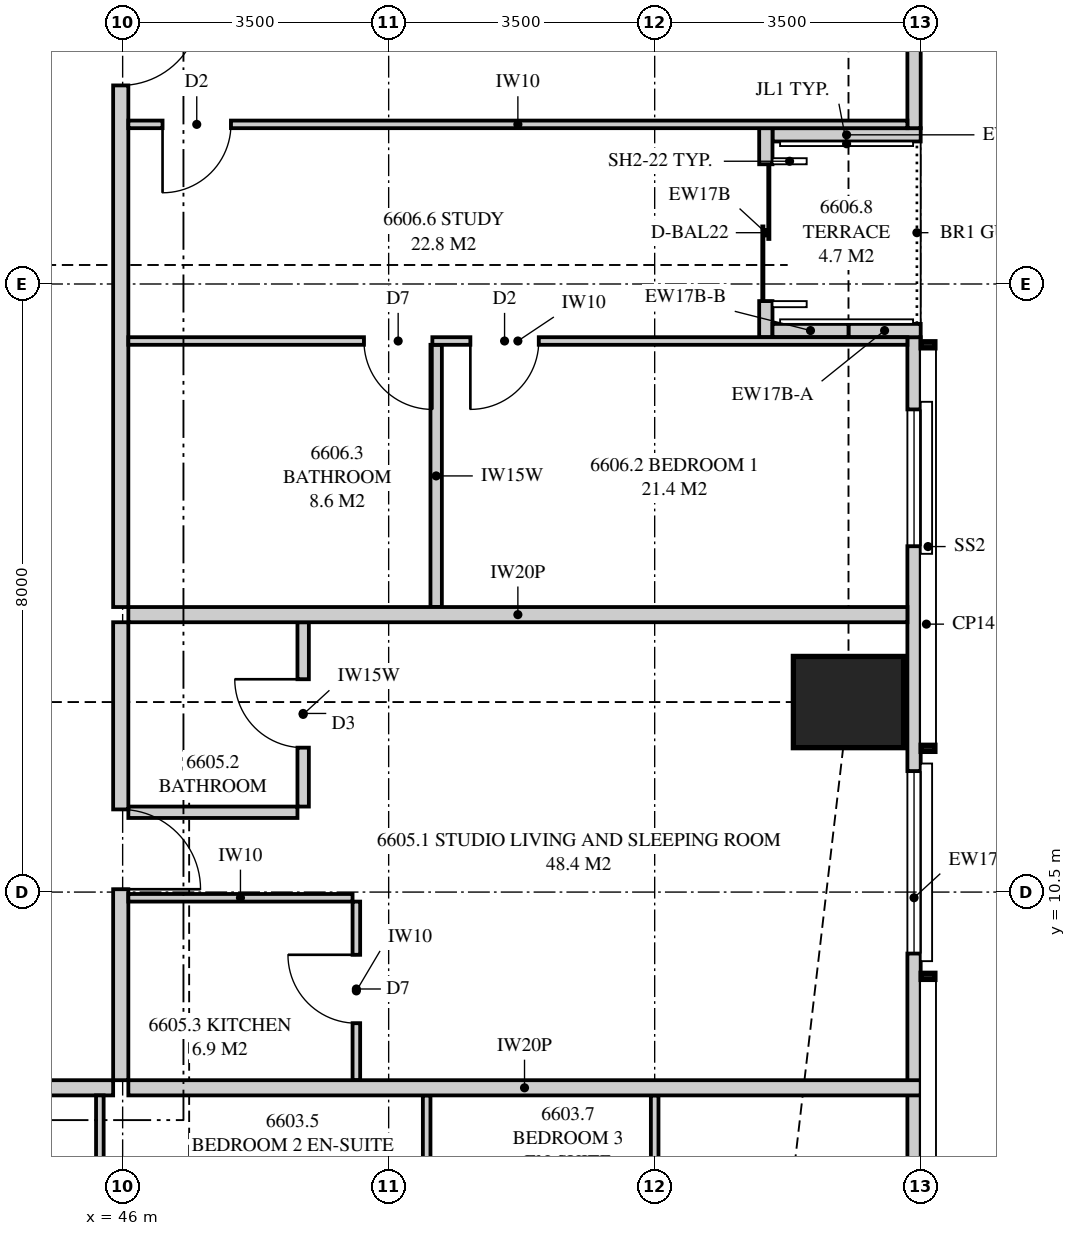
"""IFC4 building model, lengths in metres.
Left out: names, types, materials, properties, quantities, classifications, styles, units other than length and angle.
Written with IfcOpenShell. Run it as: python <this file> out.ifc"""

import sys

from ifc_helpers import new_model, si_unit, direction, frame, frame_2d, origin, origin_2d, place, context, subcontext, project, spatial, polyline, rectangle, outline, extrude, element, fill, save


model = new_model("IFC4")
c1 = context("Model", 3, precision=1e-05, world=origin(), true_north=direction((0.0, 1.0)))
c2 = subcontext(c1, "Body", "Model", "MODEL_VIEW")
j1 = project(units=[si_unit("LENGTHUNIT", "METRE"), si_unit("PLANEANGLEUNIT", "RADIAN")], contexts=[c1])
p1 = place(None, origin())
s1 = spatial("IfcSite", under=j1, at=p1, CompositionType="ELEMENT")
p2 = place(p1, origin())
s2 = spatial("IfcBuilding", under=s1, at=p2, CompositionType="ELEMENT")
p3 = place(p2, frame((0.0, 0.0, 242.45)))
s3 = spatial("IfcBuildingStorey", under=s2, at=p3, CompositionType="ELEMENT", Elevation=242.45)
p4 = place(p3, frame((55.55, 13.0, 0.0), z_axis=(0.0, 0.0, 1.0), x_axis=(1.0, 0.0, 0.0)))
e1 = element("IfcColumn", 1, at=p4, inside=s3, PredefinedType="COLUMN", context=c2, shape_type="SweptSolid", body=[
    extrude(rectangle(XDim=1.45, YDim=1.2, at=origin_2d()), origin(), (0.0, 0.0, 1.0), 3.5),
])
p5 = place(p3, frame((56.413, 3.051, 0.0), z_axis=(0.0, 0.0, 1.0), x_axis=(0.0, 1.0, 0.0)))
e2 = element("IfcWall", 2, at=p5, inside=s3, PredefinedType="SOLIDWALL", context=c2, shape_type="SweptSolid", body=[
    extrude(outline(polyline([(0.0, 0.0), (14.749, 0.0), (14.749, 2.3), (9.949, 2.3), (9.949, 3.26), (9.858, 3.26), (9.858, 2.3), (9.688, 2.3), (9.688, 3.26), (0.0, 3.26), (0.0, 0.0)])), frame((0.0, 0.087, 0.0), z_axis=(0.0, -1.0, 0.0), x_axis=(1.0, 0.0, 0.0)), (0.0, 0.0, 1.0), 0.175),
])
p6 = place(p5, frame((6.64, 0.0, 0.4)))
e3 = element("IfcOpeningElement", 3, at=p6, cuts=e2, PredefinedType="OPENING", context=c2, shape_type="SweptSolid", body=[
    extrude(rectangle(XDim=2.4, YDim=1.85, at=frame_2d((1.2, 0.925))), frame((0.0, 0.097, 0.0), z_axis=(0.0, -1.0, 0.0), x_axis=(1.0, 0.0, 0.0)), (0.0, 0.0, 1.0), 0.195),
])
p7 = place(p5, frame((11.999, 0.0, 0.4)))
e4 = element("IfcOpeningElement", 4, at=p7, cuts=e2, PredefinedType="OPENING", context=c2, shape_type="SweptSolid", body=[
    extrude(rectangle(XDim=1.8, YDim=1.85, at=frame_2d((0.9, 0.925))), frame((0.0, 0.097, 0.0), z_axis=(0.0, -1.0, 0.0), x_axis=(1.0, 0.0, 0.0)), (0.0, 0.0, 1.0), 0.195),
])
p8 = place(p3, frame((56.413, 20.55, 0.0), z_axis=(0.0, 0.0, 1.0), x_axis=(0.0, 1.0, 0.0)))
e5 = element("IfcWall", 5, at=p8, inside=s3, PredefinedType="SOLIDWALL", context=c2, shape_type="SweptSolid", body=[
    extrude(outline(polyline([(0.0, 0.0), (10.399, 0.0), (10.399, 3.26), (4.658, 3.26), (4.658, 2.3), (4.594, 2.3), (4.594, 3.26), (4.45, 3.26), (4.45, 2.3), (0.0, 2.3), (0.0, 0.0)])), frame((0.0, 0.087, 0.0), z_axis=(0.0, -1.0, 0.0), x_axis=(1.0, 0.0, 0.0)), (0.0, 0.0, 1.0), 0.175),
])
p9 = place(p8, frame((1.2, 0.0, 0.4)))
e6 = element("IfcOpeningElement", 6, at=p9, cuts=e5, PredefinedType="OPENING", context=c2, shape_type="SweptSolid", body=[
    extrude(rectangle(XDim=2.4, YDim=1.85, at=frame_2d((1.2, 0.925))), frame((0.0, 0.097, 0.0), z_axis=(0.0, -1.0, 0.0), x_axis=(1.0, 0.0, 0.0)), (0.0, 0.0, 1.0), 0.195),
])
p10 = place(p8, frame((5.988, 0.0, 0.4)))
e7 = element("IfcOpeningElement", 7, at=p10, cuts=e5, PredefinedType="OPENING", context=c2, shape_type="SweptSolid", body=[
    extrude(rectangle(XDim=1.8, YDim=1.85, at=frame_2d((0.9, 0.925))), frame((0.0, 0.097, 0.0), z_axis=(0.0, -1.0, 0.0), x_axis=(1.0, 0.0, 0.0)), (0.0, 0.0, 1.0), 0.195),
])
p11 = place(p3, frame((54.462, 17.8, 0.0), z_axis=(0.0, 0.0, 1.0), x_axis=(0.0, 1.0, 0.0)))
e8 = element("IfcWall", 8, at=p11, inside=s3, PredefinedType="SOLIDWALL", context=c2, shape_type="SweptSolid", body=[
    extrude(outline(polyline([(0.0, 0.0), (2.75, 0.0), (2.75, 3.26), (2.15, 3.26), (2.15, 2.66), (0.0, 2.66), (0.0, 0.0)])), frame((0.0, 0.087, 0.0), z_axis=(0.0, -1.0, 0.0), x_axis=(1.0, 0.0, 0.0)), (0.0, 0.0, 1.0), 0.175),
])
p12 = place(p11, frame((0.475, 0.0, 0.0)))
e9 = element("IfcOpeningElement", 9, at=p12, cuts=e8, PredefinedType="OPENING", context=c2, shape_type="SweptSolid", body=[
    extrude(rectangle(XDim=1.8, YDim=2.25, at=frame_2d((0.9, 1.125))), frame((0.0, 0.097, 0.0), z_axis=(0.0, -1.0, 0.0), x_axis=(1.0, 0.0, 0.0)), (0.0, 0.0, 1.0), 0.195),
])
p13 = place(p3, frame((56.5, 17.887, 0.0), z_axis=(0.0, 0.0, 1.0), x_axis=(-1.0, 0.0, 0.0)))
e10 = element("IfcWall", 10, at=p13, inside=s3, PredefinedType="SOLIDWALL", context=c2, shape_type="SweptSolid", body=[
    extrude(outline(polyline([(0.0, 0.0), (0.95, 0.0), (0.95, 2.3), (0.15, 2.3), (0.15, 3.26), (0.0, 3.26), (0.0, 0.0)])), frame((0.0, 0.087, 0.0), z_axis=(0.0, -1.0, 0.0), x_axis=(1.0, 0.0, 0.0)), (0.0, 0.0, 1.0), 0.175),
])
p14 = place(p3, frame((55.55, 17.887, 0.0), z_axis=(0.0, 0.0, 1.0), x_axis=(-1.0, 0.0, 0.0)))
e11 = element("IfcWall", 11, at=p14, inside=s3, PredefinedType="SOLIDWALL", context=c2, shape_type="SweptSolid", body=[
    extrude(outline(polyline([(0.0, 0.0), (1.0, 0.0), (1.0, 2.66), (0.8, 2.66), (0.8, 2.3), (0.0, 2.3), (0.0, 0.0)])), frame((0.0, 0.087, 0.0), z_axis=(0.0, -1.0, 0.0), x_axis=(1.0, 0.0, 0.0)), (0.0, 0.0, 1.0), 0.175),
])
p15 = place(p3, frame((56.5, 20.462, 0.0), z_axis=(0.0, 0.0, 1.0), x_axis=(-1.0, 0.0, 0.0)))
e12 = element("IfcWall", 12, at=p15, inside=s3, PredefinedType="SOLIDWALL", context=c2, shape_type="SweptSolid", body=[
    extrude(outline(polyline([(0.0, 0.0), (1.95, 0.0), (1.95, 3.26), (1.75, 3.26), (1.75, 2.3), (0.15, 2.3), (0.15, 3.26), (0.0, 3.26), (0.0, 0.0)])), frame((0.0, 0.087, 0.0), z_axis=(0.0, -1.0, 0.0), x_axis=(1.0, 0.0, 0.0)), (0.0, 0.0, 1.0), 0.175),
])
p16 = place(p3, frame((36.55, 7.925, 0.0), z_axis=(0.0, 0.0, 1.0), x_axis=(1.0, 0.0, 0.0)))
e13 = element("IfcWall", 13, at=p16, inside=s3, PredefinedType="PARTITIONING", context=c2, shape_type="SweptSolid", body=[
    extrude(outline(polyline([(0.0, 0.0), (9.325, 0.0), (9.325, 3.26), (9.325, 2.66), (9.015, 2.66), (9.015, 3.26), (2.01, 3.26), (2.01, 2.66), (0.0, 2.66), (0.0, 3.26), (0.0, 0.0)])), frame((0.0, 0.1, 0.0), z_axis=(0.0, -1.0, 0.0), x_axis=(1.0, 0.0, 0.0)), (0.0, 0.0, 1.0), 0.2),
])
p17 = place(p16, frame((4.15, 0.0, 0.0)))
e14 = element("IfcOpeningElement", 14, at=p17, cuts=e13, PredefinedType="OPENING", context=c2, shape_type="SweptSolid", body=[
    extrude(rectangle(XDim=1.05, YDim=2.2, at=frame_2d((0.525, 1.1))), frame((0.0, 0.11, 0.0), z_axis=(0.0, -1.0, 0.0), x_axis=(1.0, 0.0, 0.0)), (0.0, 0.0, 1.0), 0.22),
])
p18 = place(p3, frame((45.7, 0.175, 0.0), z_axis=(0.0, 0.0, 1.0), x_axis=(0.0, 1.0, 0.0)))
e15 = element("IfcWall", 15, at=p18, inside=s3, PredefinedType="PARTITIONING", context=c2, shape_type="SweptSolid", body=[
    extrude(outline(polyline([(0.0, 0.0), (7.65, 0.0), (7.65, 3.26), (7.65, 2.66), (1.635, 2.66), (1.635, 2.3), (0.0, 2.3), (0.0, 3.26), (0.0, 0.0)])), frame((0.0, 0.05, 0.0), z_axis=(0.0, -1.0, 0.0), x_axis=(1.0, 0.0, 0.0)), (0.0, 0.0, 1.0), 0.1),
])
p19 = place(p18, frame((3.8, 0.0, 0.0)))
e16 = element("IfcOpeningElement", 16, at=p19, cuts=e15, PredefinedType="OPENING", context=c2, shape_type="SweptSolid", body=[
    extrude(rectangle(XDim=0.9, YDim=2.1, at=frame_2d((0.45, 1.05))), frame((0.0, 0.06, 0.0), z_axis=(0.0, -1.0, 0.0), x_axis=(1.0, 0.0, 0.0)), (0.0, 0.0, 1.0), 0.12),
])
p20 = place(p3, frame((50.0, 0.175, 0.0), z_axis=(0.0, 0.0, 1.0), x_axis=(0.0, 1.0, 0.0)))
e17 = element("IfcWall", 17, at=p20, inside=s3, PredefinedType="PARTITIONING", context=c2, shape_type="SweptSolid", body=[
    extrude(outline(polyline([(0.0, 0.0), (7.65, 0.0), (7.65, 3.26), (2.177, 3.26), (2.177, 2.3), (0.432, 2.3), (0.432, 3.26), (0.0, 3.26), (0.0, 0.0)])), frame((0.0, 0.05, 0.0), z_axis=(0.0, -1.0, 0.0), x_axis=(1.0, 0.0, 0.0)), (0.0, 0.0, 1.0), 0.1),
])
p21 = place(p20, frame((3.8, 0.0, 0.0)))
e18 = element("IfcOpeningElement", 18, at=p21, cuts=e17, PredefinedType="OPENING", context=c2, shape_type="SweptSolid", body=[
    extrude(rectangle(XDim=0.9, YDim=2.1, at=frame_2d((0.45, 1.05))), frame((0.0, 0.06, 0.0), z_axis=(0.0, -1.0, 0.0), x_axis=(1.0, 0.0, 0.0)), (0.0, 0.0, 1.0), 0.12),
])
p22 = place(p3, frame((53.0, 0.175, 0.0), z_axis=(0.0, 0.0, 1.0), x_axis=(0.0, 1.0, 0.0)))
e19 = element("IfcWall", 19, at=p22, inside=s3, PredefinedType="PARTITIONING", context=c2, shape_type="SweptSolid", body=[
    extrude(outline(polyline([(0.0, 0.0), (7.65, 0.0), (7.65, 3.26), (2.685, 3.26), (2.685, 2.3), (0.941, 2.3), (0.941, 3.26), (0.0, 3.26), (0.0, 0.0)])), frame((0.0, 0.05, 0.0), z_axis=(0.0, -1.0, 0.0), x_axis=(1.0, 0.0, 0.0)), (0.0, 0.0, 1.0), 0.1),
])
p23 = place(p22, frame((3.8, 0.0, 0.0)))
e20 = element("IfcOpeningElement", 20, at=p23, cuts=e19, PredefinedType="OPENING", context=c2, shape_type="SweptSolid", body=[
    extrude(rectangle(XDim=0.9, YDim=2.1, at=frame_2d((0.45, 1.05))), frame((0.0, 0.06, 0.0), z_axis=(0.0, -1.0, 0.0), x_axis=(1.0, 0.0, 0.0)), (0.0, 0.0, 1.0), 0.12),
])
p24 = place(p3, frame((46.075, 7.925, 0.0), z_axis=(0.0, 0.0, 1.0), x_axis=(1.0, 0.0, 0.0)))
e21 = element("IfcWall", 21, at=p24, inside=s3, PredefinedType="PARTITIONING", context=c2, shape_type="SweptSolid", body=[
    extrude(outline(polyline([(0.0, 0.0), (10.425, 0.0), (10.425, 3.26), (9.8, 3.26), (9.8, 2.3), (7.968, 2.3), (7.968, 3.26), (2.11, 3.26), (2.11, 2.66), (0.0, 2.66), (0.0, 3.26), (0.0, 0.0)])), frame((0.0, 0.1, 0.0), z_axis=(0.0, -1.0, 0.0), x_axis=(1.0, 0.0, 0.0)), (0.0, 0.0, 1.0), 0.2),
])
p25 = place(p3, frame((56.325, 14.15, 0.0), z_axis=(0.0, 0.0, 1.0), x_axis=(-1.0, 0.0, 0.0)))
e22 = element("IfcWall", 22, at=p25, inside=s3, PredefinedType="PARTITIONING", context=c2, shape_type="SweptSolid", body=[
    extrude(outline(polyline([(0.0, 0.0), (10.25, 0.0), (10.25, 3.26), (10.25, 2.66), (1.685, 2.66), (1.685, 2.3), (0.0, 2.3), (0.0, 3.26), (0.0, 0.0)])), frame((0.0, 0.1, 0.0), z_axis=(0.0, -1.0, 0.0), x_axis=(1.0, 0.0, 0.0)), (0.0, 0.0, 1.0), 0.2),
])
p26 = place(p3, frame((45.975, 8.025, 0.0), z_axis=(0.0, 0.0, 1.0), x_axis=(0.0, 1.0, 0.0)))
e23 = element("IfcWall", 23, at=p26, inside=s3, PredefinedType="PARTITIONING", context=c2, shape_type="SweptSolid", body=[
    extrude(outline(polyline([(0.0, 0.0), (6.025, 0.0), (6.025, 3.26), (6.025, 2.66), (5.085, 2.66), (0.0, 2.66), (0.0, 3.26), (0.0, 0.0)])), frame((0.0, 0.1, 0.0), z_axis=(0.0, -1.0, 0.0), x_axis=(1.0, 0.0, 0.0)), (0.0, 0.0, 1.0), 0.2),
])
p27 = place(p26, frame((2.512, 0.0, 0.0)))
e24 = element("IfcOpeningElement", 24, at=p27, cuts=e23, PredefinedType="OPENING", context=c2, shape_type="SweptSolid", body=[
    extrude(rectangle(XDim=1.05, YDim=2.2, at=frame_2d((0.525, 1.1))), frame((0.0, 0.11, 0.0), z_axis=(0.0, -1.0, 0.0), x_axis=(1.0, 0.0, 0.0)), (0.0, 0.0, 1.0), 0.22),
])
p28 = place(p3, frame((48.375, 11.625, 0.0), z_axis=(0.0, 0.0, 1.0), x_axis=(0.0, 1.0, 0.0)))
e25 = element("IfcWall", 25, at=p28, inside=s3, PredefinedType="PLUMBINGWALL", context=c2, shape_type="SweptSolid", body=[
    extrude(outline(polyline([(0.0, 0.0), (2.425, 0.0), (2.425, 3.26), (2.425, 2.66), (0.09, 2.66), (0.09, 3.26), (0.0, 3.26), (0.0, 0.0)])), frame((0.0, 0.075, 0.0), z_axis=(0.0, -1.0, 0.0), x_axis=(1.0, 0.0, 0.0)), (0.0, 0.0, 1.0), 0.15),
])
p29 = place(p28, frame((0.775, 0.0, 0.0)))
e26 = element("IfcOpeningElement", 26, at=p29, cuts=e25, PredefinedType="OPENING", context=c2, shape_type="SweptSolid", body=[
    extrude(rectangle(XDim=0.9, YDim=2.1, at=frame_2d((0.45, 1.05))), frame((0.0, 0.085, 0.0), z_axis=(0.0, -1.0, 0.0), x_axis=(1.0, 0.0, 0.0)), (0.0, 0.0, 1.0), 0.17),
])
p30 = place(p3, frame((48.3, 11.55, 0.0), z_axis=(0.0, 0.0, 1.0), x_axis=(-1.0, 0.0, 0.0)))
e27 = element("IfcWall", 27, at=p30, inside=s3, PredefinedType="PLUMBINGWALL", context=c2, shape_type="SweptSolid", body=[
    extrude(outline(polyline([(0.0, 0.0), (2.225, 0.0), (2.225, 3.26), (2.225, 2.66), (0.14, 2.66), (0.14, 3.26), (0.0, 3.26), (0.0, 0.0)])), frame((0.0, 0.075, 0.0), z_axis=(0.0, -1.0, 0.0), x_axis=(1.0, 0.0, 0.0)), (0.0, 0.0, 1.0), 0.15),
])
p31 = place(p3, frame((49.075, 8.025, 0.0), z_axis=(0.0, 0.0, 1.0), x_axis=(0.0, 1.0, 0.0)))
e28 = element("IfcWall", 28, at=p31, inside=s3, PredefinedType="PARTITIONING", context=c2, shape_type="SweptSolid", body=[
    extrude(rectangle(XDim=2.35, YDim=0.1, at=frame_2d((1.175, 0.0))), origin(), (0.0, 0.0, 1.0), 3.26),
])
p32 = place(p31, frame((0.75, 0.0, 0.0)))
e29 = element("IfcOpeningElement", 29, at=p32, cuts=e28, PredefinedType="OPENING", context=c2, shape_type="SweptSolid", body=[
    extrude(rectangle(XDim=0.9, YDim=2.1, at=frame_2d((0.45, 1.05))), frame((0.0, 0.06, 0.0), z_axis=(0.0, -1.0, 0.0), x_axis=(1.0, 0.0, 0.0)), (0.0, 0.0, 1.0), 0.12),
])
p33 = place(p3, frame((49.025, 10.425, 0.0), z_axis=(0.0, 0.0, 1.0), x_axis=(-1.0, 0.0, 0.0)))
e30 = element("IfcWall", 30, at=p33, inside=s3, PredefinedType="PARTITIONING", context=c2, shape_type="SweptSolid", body=[
    extrude(outline(polyline([(0.0, 0.0), (2.95, 0.0), (2.95, 3.26), (2.95, 2.66), (0.89, 2.66), (0.89, 3.26), (0.0, 3.26), (0.0, 0.0)])), frame((0.0, 0.05, 0.0), z_axis=(0.0, -1.0, 0.0), x_axis=(1.0, 0.0, 0.0)), (0.0, 0.0, 1.0), 0.1),
])
p34 = place(p3, frame((45.975, 14.25, 0.0), z_axis=(0.0, 0.0, 1.0), x_axis=(0.0, 1.0, 0.0)))
e31 = element("IfcWall", 31, at=p34, inside=s3, PredefinedType="PARTITIONING", context=c2, shape_type="SweptSolid", body=[
    extrude(outline(polyline([(0.0, 0.0), (10.75, 0.0), (10.75, 2.66), (9.44, 2.66), (9.44, 3.26), (5.81, 3.26), (5.81, 2.66), (3.19, 2.66), (3.19, 3.26), (0.06, 3.26), (0.06, 2.66), (0.0, 2.66), (0.0, 0.0)])), frame((0.0, 0.1, 0.0), z_axis=(0.0, -1.0, 0.0), x_axis=(1.0, 0.0, 0.0)), (0.0, 0.0, 1.0), 0.2),
])
p35 = place(p34, frame((6.863, 0.0, 0.0)))
e32 = element("IfcOpeningElement", 32, at=p35, cuts=e31, PredefinedType="OPENING", context=c2, shape_type="SweptSolid", body=[
    extrude(rectangle(XDim=1.05, YDim=2.2, at=frame_2d((0.525, 1.1))), frame((0.0, 0.11, 0.0), z_axis=(0.0, -1.0, 0.0), x_axis=(1.0, 0.0, 0.0)), (0.0, 0.0, 1.0), 0.22),
])
p36 = place(p3, frame((56.325, 17.75, 0.0), z_axis=(0.0, 0.0, 1.0), x_axis=(-1.0, 0.0, 0.0)))
e33 = element("IfcWall", 33, at=p36, inside=s3, PredefinedType="PARTITIONING", context=c2, shape_type="SweptSolid", body=[
    extrude(outline(polyline([(0.0, 0.0), (10.25, 0.0), (10.25, 3.26), (10.25, 2.66), (1.635, 2.66), (1.635, 2.3), (0.0, 2.3), (0.0, 3.26), (0.0, 0.0)])), frame((0.0, 0.05, 0.0), z_axis=(0.0, -1.0, 0.0), x_axis=(1.0, 0.0, 0.0)), (0.0, 0.0, 1.0), 0.1),
])
p37 = place(p36, frame((4.85, 0.0, 0.0)))
e34 = element("IfcOpeningElement", 34, at=p37, cuts=e33, PredefinedType="OPENING", context=c2, shape_type="SweptSolid", body=[
    extrude(rectangle(XDim=0.9, YDim=2.1, at=frame_2d((0.45, 1.05))), frame((0.0, 0.06, 0.0), z_axis=(0.0, -1.0, 0.0), x_axis=(1.0, 0.0, 0.0)), (0.0, 0.0, 1.0), 0.12),
])
p38 = place(p36, frame((6.25, 0.0, 0.0)))
e35 = element("IfcOpeningElement", 35, at=p38, cuts=e33, PredefinedType="OPENING", context=c2, shape_type="SweptSolid", body=[
    extrude(rectangle(XDim=0.9, YDim=2.1, at=frame_2d((0.45, 1.05))), frame((0.0, 0.06, 0.0), z_axis=(0.0, -1.0, 0.0), x_axis=(1.0, 0.0, 0.0)), (0.0, 0.0, 1.0), 0.12),
])
p39 = place(p3, frame((50.125, 14.25, 0.0), z_axis=(0.0, 0.0, 1.0), x_axis=(0.0, 1.0, 0.0)))
e36 = element("IfcWall", 36, at=p39, inside=s3, PredefinedType="PLUMBINGWALL", context=c2, shape_type="SweptSolid", body=[
    extrude(outline(polyline([(0.0, 0.0), (3.45, 0.0), (3.45, 3.26), (3.45, 2.66), (3.215, 2.66), (3.215, 3.26), (0.035, 3.26), (0.035, 2.66), (0.0, 2.66), (0.0, 3.26), (0.0, 0.0)])), frame((0.0, 0.075, 0.0), z_axis=(0.0, -1.0, 0.0), x_axis=(1.0, 0.0, 0.0)), (0.0, 0.0, 1.0), 0.15),
])
p40 = place(p3, frame((56.325, 20.6, 0.0), z_axis=(0.0, 0.0, 1.0), x_axis=(-1.0, 0.0, 0.0)))
e37 = element("IfcWall", 37, at=p40, inside=s3, PredefinedType="PARTITIONING", context=c2, shape_type="SweptSolid", body=[
    extrude(outline(polyline([(0.0, 0.0), (10.25, 0.0), (10.25, 3.26), (1.635, 3.26), (1.635, 2.3), (0.0, 2.3), (0.0, 3.26), (0.0, 0.0)])), frame((0.0, 0.05, 0.0), z_axis=(0.0, -1.0, 0.0), x_axis=(1.0, 0.0, 0.0)), (0.0, 0.0, 1.0), 0.1),
])
p41 = place(p40, frame((8.9, 0.0, 0.0)))
e38 = element("IfcOpeningElement", 38, at=p41, cuts=e37, PredefinedType="OPENING", context=c2, shape_type="SweptSolid", body=[
    extrude(rectangle(XDim=0.9, YDim=2.1, at=frame_2d((0.45, 1.05))), frame((0.0, 0.06, 0.0), z_axis=(0.0, -1.0, 0.0), x_axis=(1.0, 0.0, 0.0)), (0.0, 0.0, 1.0), 0.12),
])
p42 = place(p6, origin())
e39 = element("IfcWindow", 39, at=p42, inside=s3, PartitioningType="SINGLE_PANEL", PredefinedType="WINDOW", context=c2, shape_type="SweptSolid", body=[
    extrude(rectangle(XDim=2.4, YDim=1.85, at=frame_2d((1.2, 0.925))), frame((0.0, 0.03, 0.0), z_axis=(0.0, -1.0, 0.0), x_axis=(1.0, 0.0, 0.0)), (0.0, 0.0, 1.0), 0.06),
])
fill(e3, e39)
p43 = place(p7, origin())
e40 = element("IfcWindow", 40, at=p43, inside=s3, PartitioningType="SINGLE_PANEL", PredefinedType="WINDOW", context=c2, shape_type="SweptSolid", body=[
    extrude(rectangle(XDim=1.8, YDim=1.85, at=frame_2d((0.9, 0.925))), frame((0.0, 0.03, 0.0), z_axis=(0.0, -1.0, 0.0), x_axis=(1.0, 0.0, 0.0)), (0.0, 0.0, 1.0), 0.06),
])
fill(e4, e40)
p44 = place(p12, origin())
e41 = element("IfcDoor", 41, at=p44, inside=s3, OperationType="SLIDING_TO_LEFT", PredefinedType="DOOR", context=c2, shape_type="SweptSolid", body=[
    extrude(rectangle(XDim=1.8, YDim=2.25, at=frame_2d((0.9, 1.125))), frame((0.0, 0.025, 0.0), z_axis=(0.0, -1.0, 0.0), x_axis=(1.0, 0.0, 0.0)), (0.0, 0.0, 1.0), 0.05),
])
fill(e9, e41)
p45 = place(p27, frame((1.05, 0.0, 0.0), z_axis=(0.0, 0.0, 1.0), x_axis=(-1.0, 0.0, 0.0)))
e42 = element("IfcDoor", 42, at=p45, inside=s3, OperationType="SINGLE_SWING_RIGHT", PredefinedType="DOOR", context=c2, shape_type="SweptSolid", body=[
    extrude(rectangle(XDim=1.05, YDim=2.2, at=frame_2d((0.525, 1.1))), frame((0.0, 0.025, 0.0), z_axis=(0.0, -1.0, 0.0), x_axis=(1.0, 0.0, 0.0)), (0.0, 0.0, 1.0), 0.05),
])
fill(e24, e42)
p46 = place(p29, origin())
e43 = element("IfcDoor", 43, at=p46, inside=s3, OperationType="SINGLE_SWING_RIGHT", PredefinedType="DOOR", context=c2, shape_type="SweptSolid", body=[
    extrude(rectangle(XDim=0.9, YDim=2.1, at=frame_2d((0.45, 1.05))), frame((0.0, 0.025, 0.0), z_axis=(0.0, -1.0, 0.0), x_axis=(1.0, 0.0, 0.0)), (0.0, 0.0, 1.0), 0.05),
])
fill(e26, e43)
p47 = place(p32, origin())
e44 = element("IfcDoor", 44, at=p47, inside=s3, OperationType="SINGLE_SWING_RIGHT", PredefinedType="DOOR", context=c2, shape_type="SweptSolid", body=[
    extrude(rectangle(XDim=0.9, YDim=2.1, at=frame_2d((0.45, 1.05))), frame((0.0, 0.025, 0.0), z_axis=(0.0, -1.0, 0.0), x_axis=(1.0, 0.0, 0.0)), (0.0, 0.0, 1.0), 0.05),
])
fill(e29, e44)
p48 = place(p35, frame((1.05, 0.0, 0.0), z_axis=(0.0, 0.0, 1.0), x_axis=(-1.0, 0.0, 0.0)))
e45 = element("IfcDoor", 45, at=p48, inside=s3, OperationType="SINGLE_SWING_LEFT", PredefinedType="DOOR", context=c2, shape_type="SweptSolid", body=[
    extrude(rectangle(XDim=1.05, YDim=2.2, at=frame_2d((0.525, 1.1))), frame((0.0, 0.025, 0.0), z_axis=(0.0, -1.0, 0.0), x_axis=(1.0, 0.0, 0.0)), (0.0, 0.0, 1.0), 0.05),
])
fill(e32, e45)
p49 = place(p37, origin())
e46 = element("IfcDoor", 46, at=p49, inside=s3, OperationType="SINGLE_SWING_RIGHT", PredefinedType="DOOR", context=c2, shape_type="SweptSolid", body=[
    extrude(rectangle(XDim=0.9, YDim=2.1, at=frame_2d((0.45, 1.05))), frame((0.0, 0.025, 0.0), z_axis=(0.0, -1.0, 0.0), x_axis=(1.0, 0.0, 0.0)), (0.0, 0.0, 1.0), 0.05),
])
fill(e34, e46)
p50 = place(p38, origin())
e47 = element("IfcDoor", 47, at=p50, inside=s3, OperationType="SINGLE_SWING_LEFT", PredefinedType="DOOR", context=c2, shape_type="SweptSolid", body=[
    extrude(rectangle(XDim=0.9, YDim=2.1, at=frame_2d((0.45, 1.05))), frame((0.0, 0.025, 0.0), z_axis=(0.0, -1.0, 0.0), x_axis=(1.0, 0.0, 0.0)), (0.0, 0.0, 1.0), 0.05),
])
fill(e35, e47)
p51 = place(p41, origin())
e48 = element("IfcDoor", 48, at=p51, inside=s3, OperationType="SINGLE_SWING_RIGHT", PredefinedType="DOOR", context=c2, shape_type="SweptSolid", body=[
    extrude(rectangle(XDim=0.9, YDim=2.1, at=frame_2d((0.45, 1.05))), frame((0.0, 0.025, 0.0), z_axis=(0.0, -1.0, 0.0), x_axis=(1.0, 0.0, 0.0)), (0.0, 0.0, 1.0), 0.05),
])
fill(e38, e48)
save(model, sys.argv[1])
